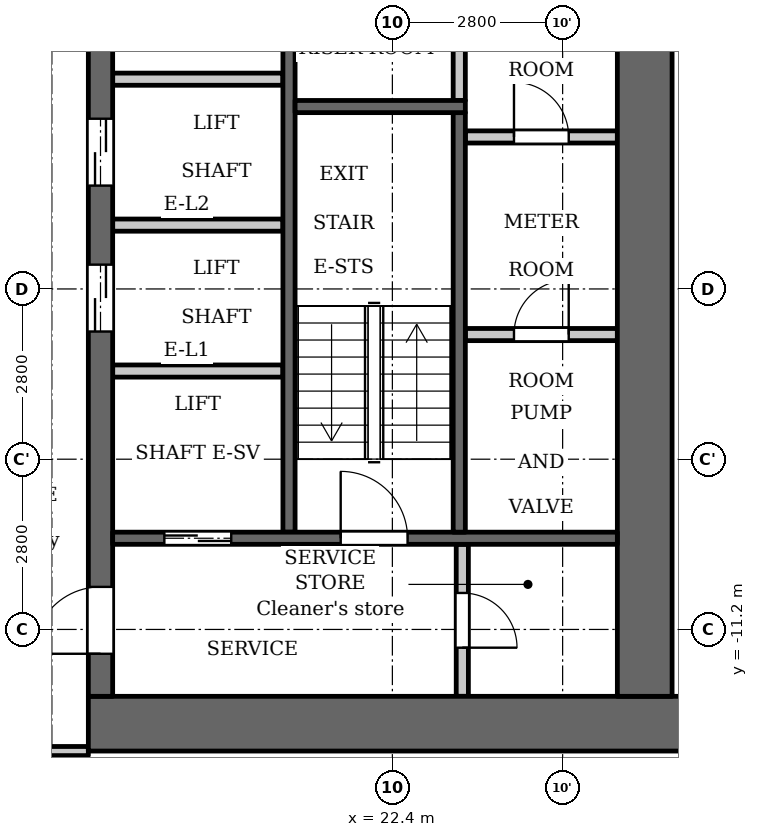
"""IFC4 building model, lengths in metres.
Left out: names, types, materials, properties, quantities, classifications, styles, units other than length and angle.
Written with IfcOpenShell. Run it as: python <this file> out.ifc"""

import sys

from ifc_helpers import new_model, si_unit, direction, frame, frame_2d, origin, place, context, subcontext, project, spatial, rectangle, extrude, element, fill, save


model = new_model("IFC4")
c1 = context("Model", 3, precision=1e-05, world=origin(), true_north=direction((0.0, 1.0)))
c2 = subcontext(c1, "Body", "Model", "MODEL_VIEW")
j1 = project(units=[si_unit("LENGTHUNIT", "METRE"), si_unit("PLANEANGLEUNIT", "RADIAN")], contexts=[c1])
p1 = place(None, origin())
s1 = spatial("IfcSite", under=j1, at=p1, CompositionType="ELEMENT")
p2 = place(p1, origin())
s2 = spatial("IfcBuilding", under=s1, at=p2, CompositionType="ELEMENT")
p3 = place(p2, frame((0.0, 0.0, 114.8)))
s3 = spatial("IfcBuildingStorey", under=s2, at=p3, CompositionType="ELEMENT", Elevation=114.8)
p4 = place(p3, frame((23.5, -2.5, 0.0), z_axis=(0.0, 0.0, 1.0), x_axis=(0.0, 1.0, 0.0)))
e1 = element("IfcWall", 1, at=p4, inside=s3, PredefinedType="PARTITIONING", context=c2, shape_type="SweptSolid", body=[
    extrude(rectangle(XDim=2.65, YDim=0.2, at=frame_2d((1.325, 0.0))), origin(), (0.0, 0.0, 1.0), 3.2),
])
p5 = place(p3, frame((20.7, -9.6, 0.0), z_axis=(0.0, 0.0, 1.0), x_axis=(0.0, 1.0, 0.0)))
e2 = element("IfcWall", 2, at=p5, inside=s3, PredefinedType="SHEAR", context=c2, shape_type="SweptSolid", body=[
    extrude(rectangle(XDim=9.75, YDim=0.2, at=frame_2d((4.875, 0.0))), origin(), (0.0, 0.0, 1.0), 3.2),
])
p6 = place(p3, frame((17.4, -12.75, 0.0), z_axis=(0.0, 0.0, 1.0), x_axis=(1.0, 0.0, 0.0)))
e3 = element("IfcWall", 3, at=p6, inside=s3, PredefinedType="SHEAR", context=c2, shape_type="SweptSolid", body=[
    extrude(rectangle(XDim=10.4, YDim=0.9, at=frame_2d((5.2, 0.0))), origin(), (0.0, 0.0, 1.0), 3.2),
])
p7 = place(p3, frame((17.6, -12.3, 0.0), z_axis=(0.0, 0.0, 1.0), x_axis=(0.0, 1.0, 0.0)))
e4 = element("IfcWall", 4, at=p7, inside=s3, PredefinedType="SHEAR", context=c2, shape_type="SweptSolid", body=[
    extrude(rectangle(XDim=24.6, YDim=0.4, at=frame_2d((12.3, 0.0))), origin(), (0.0, 0.0, 1.0), 3.2),
])
p8 = place(p7, frame((6.0, 0.0, 0.0)))
e5 = element("IfcOpeningElement", 5, at=p8, cuts=e4, PredefinedType="OPENING", context=c2, shape_type="SweptSolid", body=[
    extrude(rectangle(XDim=1.1, YDim=2.1, at=frame_2d((0.55, 1.05))), frame((0.0, 0.21, 0.0), z_axis=(0.0, -1.0, 0.0), x_axis=(1.0, 0.0, 0.0)), (0.0, 0.0, 1.0), 0.42),
])
p9 = place(p7, frame((8.4, 0.0, 0.0)))
e6 = element("IfcOpeningElement", 6, at=p9, cuts=e4, PredefinedType="OPENING", context=c2, shape_type="SweptSolid", body=[
    extrude(rectangle(XDim=1.1, YDim=2.1, at=frame_2d((0.55, 1.05))), frame((0.0, 0.21, 0.0), z_axis=(0.0, -1.0, 0.0), x_axis=(1.0, 0.0, 0.0)), (0.0, 0.0, 1.0), 0.42),
])
p10 = place(p7, frame((10.8, 0.0, 0.0)))
e7 = element("IfcOpeningElement", 7, at=p10, cuts=e4, PredefinedType="OPENING", context=c2, shape_type="SweptSolid", body=[
    extrude(rectangle(XDim=1.1, YDim=2.1, at=frame_2d((0.55, 1.05))), frame((0.0, 0.21, 0.0), z_axis=(0.0, -1.0, 0.0), x_axis=(1.0, 0.0, 0.0)), (0.0, 0.0, 1.0), 0.42),
])
p11 = place(p7, frame((16.75, 0.0, 0.0)))
e8 = element("IfcOpeningElement", 8, at=p11, cuts=e4, PredefinedType="OPENING", context=c2, shape_type="SweptSolid", body=[
    extrude(rectangle(XDim=0.9, YDim=2.1, at=frame_2d((0.45, 1.05))), frame((0.0, 0.21, 0.0), z_axis=(0.0, -1.0, 0.0), x_axis=(1.0, 0.0, 0.0)), (0.0, 0.0, 1.0), 0.42),
])
p12 = place(p7, frame((22.8, 0.0, 0.0)))
e9 = element("IfcOpeningElement", 9, at=p12, cuts=e4, PredefinedType="OPENING", context=c2, shape_type="SweptSolid", body=[
    extrude(rectangle(XDim=1.1, YDim=2.1, at=frame_2d((0.55, 1.05))), frame((0.0, 0.21, 0.0), z_axis=(0.0, -1.0, 0.0), x_axis=(1.0, 0.0, 0.0)), (0.0, 0.0, 1.0), 0.42),
])
p13 = place(p7, frame((0.7, 0.0, 0.0)))
e10 = element("IfcOpeningElement", 10, at=p13, cuts=e4, PredefinedType="OPENING", context=c2, shape_type="SweptSolid", body=[
    extrude(rectangle(XDim=1.1, YDim=2.1, at=frame_2d((0.55, 1.05))), frame((0.0, 0.21, 0.0), z_axis=(0.0, -1.0, 0.0), x_axis=(1.0, 0.0, 0.0)), (0.0, 0.0, 1.0), 0.42),
])
p14 = place(p7, frame((12.775, 0.0, 0.0)))
e11 = element("IfcOpeningElement", 11, at=p14, cuts=e4, PredefinedType="OPENING", context=c2, shape_type="SweptSolid", body=[
    extrude(rectangle(XDim=1.8, YDim=2.1, at=frame_2d((0.9, 1.05))), frame((0.0, 0.21, 0.0), z_axis=(0.0, -1.0, 0.0), x_axis=(1.0, 0.0, 0.0)), (0.0, 0.0, 1.0), 0.42),
])
p15 = place(p3, frame((26.55, -12.3, 0.0), z_axis=(0.0, 0.0, 1.0), x_axis=(0.0, 1.0, 0.0)))
e12 = element("IfcWall", 12, at=p15, inside=s3, PredefinedType="SHEAR", context=c2, shape_type="SweptSolid", body=[
    extrude(rectangle(XDim=24.6, YDim=0.9, at=frame_2d((12.3, 0.0))), origin(), (0.0, 0.0, 1.0), 3.2),
])
p16 = place(p3, frame((23.55, -12.3, 0.0), z_axis=(0.0, 0.0, 1.0), x_axis=(0.0, 1.0, 0.0)))
e13 = element("IfcWall", 13, at=p16, inside=s3, PredefinedType="PARTITIONING", context=c2, shape_type="SweptSolid", body=[
    extrude(rectangle(XDim=2.5, YDim=0.2, at=frame_2d((1.25, 0.0))), origin(), (0.0, 0.0, 1.0), 3.2),
])
p17 = place(p16, frame((0.8, 0.0, 0.0)))
e14 = element("IfcOpeningElement", 14, at=p17, cuts=e13, PredefinedType="OPENING", context=c2, shape_type="SweptSolid", body=[
    extrude(rectangle(XDim=0.9, YDim=2.1, at=frame_2d((0.45, 1.05))), frame((0.0, 0.11, 0.0), z_axis=(0.0, -1.0, 0.0), x_axis=(1.0, 0.0, 0.0)), (0.0, 0.0, 1.0), 0.22),
])
p18 = place(p3, frame((23.6, -6.35, 0.0), z_axis=(0.0, 0.0, 1.0), x_axis=(1.0, 0.0, 0.0)))
e15 = element("IfcWall", 15, at=p18, inside=s3, PredefinedType="PARTITIONING", context=c2, shape_type="SweptSolid", body=[
    extrude(rectangle(XDim=2.5, YDim=0.2, at=frame_2d((1.25, 0.0))), origin(), (0.0, 0.0, 1.0), 3.2),
])
p19 = place(p18, frame((0.8, 0.0, 0.0)))
e16 = element("IfcOpeningElement", 16, at=p19, cuts=e15, PredefinedType="OPENING", context=c2, shape_type="SweptSolid", body=[
    extrude(rectangle(XDim=0.9, YDim=2.1, at=frame_2d((0.45, 1.05))), frame((0.0, 0.11, 0.0), z_axis=(0.0, -1.0, 0.0), x_axis=(1.0, 0.0, 0.0)), (0.0, 0.0, 1.0), 0.22),
])
p20 = place(p3, frame((23.6, -3.1, 0.0), z_axis=(0.0, 0.0, 1.0), x_axis=(1.0, 0.0, 0.0)))
e17 = element("IfcWall", 17, at=p20, inside=s3, PredefinedType="PARTITIONING", context=c2, shape_type="SweptSolid", body=[
    extrude(rectangle(XDim=2.5, YDim=0.2, at=frame_2d((1.25, 0.0))), origin(), (0.0, 0.0, 1.0), 3.2),
])
p21 = place(p20, frame((0.8, 0.0, 0.0)))
e18 = element("IfcOpeningElement", 18, at=p21, cuts=e17, PredefinedType="OPENING", context=c2, shape_type="SweptSolid", body=[
    extrude(rectangle(XDim=0.9, YDim=2.1, at=frame_2d((0.45, 1.05))), frame((0.0, 0.11, 0.0), z_axis=(0.0, -1.0, 0.0), x_axis=(1.0, 0.0, 0.0)), (0.0, 0.0, 1.0), 0.22),
])
p22 = place(p3, frame((17.8, -9.7, 0.0), z_axis=(0.0, 0.0, 1.0), x_axis=(1.0, 0.0, 0.0)))
e19 = element("IfcWall", 19, at=p22, inside=s3, PredefinedType="SHEAR", context=c2, shape_type="SweptSolid", body=[
    extrude(rectangle(XDim=8.3, YDim=0.2, at=frame_2d((4.15, 0.0))), origin(), (0.0, 0.0, 1.0), 3.2),
])
p23 = place(p22, frame((0.85, 0.0, 0.0)))
e20 = element("IfcOpeningElement", 20, at=p23, cuts=e19, PredefinedType="OPENING", context=c2, shape_type="SweptSolid", body=[
    extrude(rectangle(XDim=1.1, YDim=2.1, at=frame_2d((0.55, 1.05))), frame((0.0, 0.11, 0.0), z_axis=(0.0, -1.0, 0.0), x_axis=(1.0, 0.0, 0.0)), (0.0, 0.0, 1.0), 0.22),
])
p24 = place(p22, frame((3.75, 0.0, 0.0)))
e21 = element("IfcOpeningElement", 21, at=p24, cuts=e19, PredefinedType="OPENING", context=c2, shape_type="SweptSolid", body=[
    extrude(rectangle(XDim=1.1, YDim=2.1, at=frame_2d((0.55, 1.05))), frame((0.0, 0.11, 0.0), z_axis=(0.0, -1.0, 0.0), x_axis=(1.0, 0.0, 0.0)), (0.0, 0.0, 1.0), 0.22),
])
for number, where, z_axis, x_axis in (
    (22, (17.8, -6.95, 0.0), (0.0, 0.0, 1.0), (1.0, 0.0, 0.0)),
    (23, (17.8, -4.55, 0.0), (0.0, 0.0, 1.0), (1.0, 0.0, 0.0)),
    (24, (17.8, -2.15, 0.0), (0.0, 0.0, 1.0), (1.0, 0.0, 0.0)),
):
    element("IfcWall", number, at=place(p3, frame(where, z_axis=z_axis, x_axis=x_axis)), inside=s3, PredefinedType="PARTITIONING", context=c2, shape_type="SweptSolid", body=[
        extrude(rectangle(XDim=2.8, YDim=0.2, at=frame_2d((1.4, 0.0))), origin(), (0.0, 0.0, 1.0), 3.2),
    ])
p25 = place(p3, frame((23.5, -9.6, 0.0), z_axis=(0.0, 0.0, 1.0), x_axis=(0.0, 1.0, 0.0)))
e25 = element("IfcWall", 25, at=p25, inside=s3, PredefinedType="SHEAR", context=c2, shape_type="SweptSolid", body=[
    extrude(rectangle(XDim=6.9, YDim=0.2, at=frame_2d((3.45, 0.0))), origin(), (0.0, 0.0, 1.0), 3.2),
])
p26 = place(p3, frame((20.8, -2.6, 0.0), z_axis=(0.0, 0.0, 1.0), x_axis=(1.0, 0.0, 0.0)))
e26 = element("IfcWall", 26, at=p26, inside=s3, PredefinedType="SHEAR", context=c2, shape_type="SweptSolid", body=[
    extrude(rectangle(XDim=2.8, YDim=0.2, at=frame_2d((1.4, 0.0))), origin(), (0.0, 0.0, 1.0), 3.2),
])
p27 = place(p3, frame((-17.4, -13.2, 0.0), z_axis=(0.0, 0.0, 1.0), x_axis=(1.0, 0.0, 0.0)))
e27 = element("IfcWall", 27, at=p27, inside=s3, PredefinedType="PARTITIONING", context=c2, shape_type="SweptSolid", body=[
    extrude(rectangle(XDim=34.8, YDim=0.15, at=frame_2d((17.4, 0.0))), origin(), (0.0, 0.0, 1.0), 3.2),
])
p28 = place(p27, frame((0.65, 0.0, 0.0)))
e28 = element("IfcOpeningElement", 28, at=p28, cuts=e27, PredefinedType="OPENING", context=c2, shape_type="SweptSolid", body=[
    extrude(rectangle(XDim=1.0, YDim=2.1, at=frame_2d((0.5, 1.05))), frame((0.0, 0.085, 0.0), z_axis=(0.0, -1.0, 0.0), x_axis=(1.0, 0.0, 0.0)), (0.0, 0.0, 1.0), 0.17),
])
p29 = place(p27, frame((33.05, 0.0, 0.0)))
e29 = element("IfcOpeningElement", 29, at=p29, cuts=e27, PredefinedType="OPENING", context=c2, shape_type="SweptSolid", body=[
    extrude(rectangle(XDim=1.0, YDim=2.1, at=frame_2d((0.5, 1.05))), frame((0.0, 0.085, 0.0), z_axis=(0.0, -1.0, 0.0), x_axis=(1.0, 0.0, 0.0)), (0.0, 0.0, 1.0), 0.17),
])
p30 = place(p27, frame((4.55, 0.0, 0.0)))
e30 = element("IfcOpeningElement", 30, at=p30, cuts=e27, PredefinedType="OPENING", context=c2, shape_type="SweptSolid", body=[
    extrude(rectangle(XDim=1.0, YDim=2.1, at=frame_2d((0.5, 1.05))), frame((0.0, 0.085, 0.0), z_axis=(0.0, -1.0, 0.0), x_axis=(1.0, 0.0, 0.0)), (0.0, 0.0, 1.0), 0.17),
])
p31 = place(p27, frame((6.9, 0.0, 0.0)))
e31 = element("IfcOpeningElement", 31, at=p31, cuts=e27, PredefinedType="OPENING", context=c2, shape_type="SweptSolid", body=[
    extrude(rectangle(XDim=1.0, YDim=2.1, at=frame_2d((0.5, 1.05))), frame((0.0, 0.085, 0.0), z_axis=(0.0, -1.0, 0.0), x_axis=(1.0, 0.0, 0.0)), (0.0, 0.0, 1.0), 0.17),
])
p32 = place(p27, frame((15.75, 0.0, 0.0)))
e32 = element("IfcOpeningElement", 32, at=p32, cuts=e27, PredefinedType="OPENING", context=c2, shape_type="SweptSolid", body=[
    extrude(rectangle(XDim=1.0, YDim=2.1, at=frame_2d((0.5, 1.05))), frame((0.0, 0.085, 0.0), z_axis=(0.0, -1.0, 0.0), x_axis=(1.0, 0.0, 0.0)), (0.0, 0.0, 1.0), 0.17),
])
p33 = place(p27, frame((18.1, 0.0, 0.0)))
e33 = element("IfcOpeningElement", 33, at=p33, cuts=e27, PredefinedType="OPENING", context=c2, shape_type="SweptSolid", body=[
    extrude(rectangle(XDim=1.0, YDim=2.1, at=frame_2d((0.5, 1.05))), frame((0.0, 0.085, 0.0), z_axis=(0.0, -1.0, 0.0), x_axis=(1.0, 0.0, 0.0)), (0.0, 0.0, 1.0), 0.17),
])
p34 = place(p27, frame((26.95, 0.0, 0.0)))
e34 = element("IfcOpeningElement", 34, at=p34, cuts=e27, PredefinedType="OPENING", context=c2, shape_type="SweptSolid", body=[
    extrude(rectangle(XDim=1.0, YDim=2.1, at=frame_2d((0.5, 1.05))), frame((0.0, 0.085, 0.0), z_axis=(0.0, -1.0, 0.0), x_axis=(1.0, 0.0, 0.0)), (0.0, 0.0, 1.0), 0.17),
])
p35 = place(p27, frame((29.25, 0.0, 0.0)))
e35 = element("IfcOpeningElement", 35, at=p35, cuts=e27, PredefinedType="OPENING", context=c2, shape_type="SweptSolid", body=[
    extrude(rectangle(XDim=1.0, YDim=2.1, at=frame_2d((0.5, 1.05))), frame((0.0, 0.085, 0.0), z_axis=(0.0, -1.0, 0.0), x_axis=(1.0, 0.0, 0.0)), (0.0, 0.0, 1.0), 0.17),
])
p36 = place(p23, origin())
e36 = element("IfcDoor", 36, at=p36, inside=s3, OperationType="DOUBLE_DOOR_SLIDING", PredefinedType="DOOR", context=c2, shape_type="SweptSolid", body=[
    extrude(rectangle(XDim=1.1, YDim=2.1, at=frame_2d((0.55, 1.05))), frame((0.0, 0.025, 0.0), z_axis=(0.0, -1.0, 0.0), x_axis=(1.0, 0.0, 0.0)), (0.0, 0.0, 1.0), 0.05),
])
fill(e20, e36)
p37 = place(p8, origin())
e37 = element("IfcDoor", 37, at=p37, inside=s3, OperationType="DOUBLE_DOOR_SLIDING", PredefinedType="DOOR", context=c2, shape_type="SweptSolid", body=[
    extrude(rectangle(XDim=1.1, YDim=2.1, at=frame_2d((0.55, 1.05))), frame((0.0, 0.025, 0.0), z_axis=(0.0, -1.0, 0.0), x_axis=(1.0, 0.0, 0.0)), (0.0, 0.0, 1.0), 0.05),
])
fill(e5, e37)
p38 = place(p9, origin())
e38 = element("IfcDoor", 38, at=p38, inside=s3, OperationType="DOUBLE_DOOR_SLIDING", PredefinedType="DOOR", context=c2, shape_type="SweptSolid", body=[
    extrude(rectangle(XDim=1.1, YDim=2.1, at=frame_2d((0.55, 1.05))), frame((0.0, 0.025, 0.0), z_axis=(0.0, -1.0, 0.0), x_axis=(1.0, 0.0, 0.0)), (0.0, 0.0, 1.0), 0.05),
])
fill(e6, e38)
p39 = place(p13, origin())
e39 = element("IfcDoor", 39, at=p39, inside=s3, OperationType="SINGLE_SWING_RIGHT", PredefinedType="DOOR", context=c2, shape_type="SweptSolid", body=[
    extrude(rectangle(XDim=1.1, YDim=2.1, at=frame_2d((0.55, 1.05))), frame((0.0, 0.025, 0.0), z_axis=(0.0, -1.0, 0.0), x_axis=(1.0, 0.0, 0.0)), (0.0, 0.0, 1.0), 0.05),
])
fill(e10, e39)
p40 = place(p17, origin())
e40 = element("IfcDoor", 40, at=p40, inside=s3, OperationType="SINGLE_SWING_LEFT", PredefinedType="DOOR", context=c2, shape_type="SweptSolid", body=[
    extrude(rectangle(XDim=0.9, YDim=2.1, at=frame_2d((0.45, 1.05))), frame((0.0, 0.025, 0.0), z_axis=(0.0, -1.0, 0.0), x_axis=(1.0, 0.0, 0.0)), (0.0, 0.0, 1.0), 0.05),
])
fill(e14, e40)
p41 = place(p24, origin())
e41 = element("IfcDoor", 41, at=p41, inside=s3, OperationType="SINGLE_SWING_RIGHT", PredefinedType="DOOR", context=c2, shape_type="SweptSolid", body=[
    extrude(rectangle(XDim=1.1, YDim=2.1, at=frame_2d((0.55, 1.05))), frame((0.0, 0.025, 0.0), z_axis=(0.0, -1.0, 0.0), x_axis=(1.0, 0.0, 0.0)), (0.0, 0.0, 1.0), 0.05),
])
fill(e21, e41)
p42 = place(p19, origin())
e42 = element("IfcDoor", 42, at=p42, inside=s3, OperationType="SINGLE_SWING_LEFT", PredefinedType="DOOR", context=c2, shape_type="SweptSolid", body=[
    extrude(rectangle(XDim=0.9, YDim=2.1, at=frame_2d((0.45, 1.05))), frame((0.0, 0.025, 0.0), z_axis=(0.0, -1.0, 0.0), x_axis=(1.0, 0.0, 0.0)), (0.0, 0.0, 1.0), 0.05),
])
fill(e16, e42)
p43 = place(p21, origin())
e43 = element("IfcDoor", 43, at=p43, inside=s3, OperationType="SINGLE_SWING_RIGHT", PredefinedType="DOOR", context=c2, shape_type="SweptSolid", body=[
    extrude(rectangle(XDim=0.9, YDim=2.1, at=frame_2d((0.45, 1.05))), frame((0.0, 0.025, 0.0), z_axis=(0.0, -1.0, 0.0), x_axis=(1.0, 0.0, 0.0)), (0.0, 0.0, 1.0), 0.05),
])
fill(e18, e43)
save(model, sys.argv[1])
